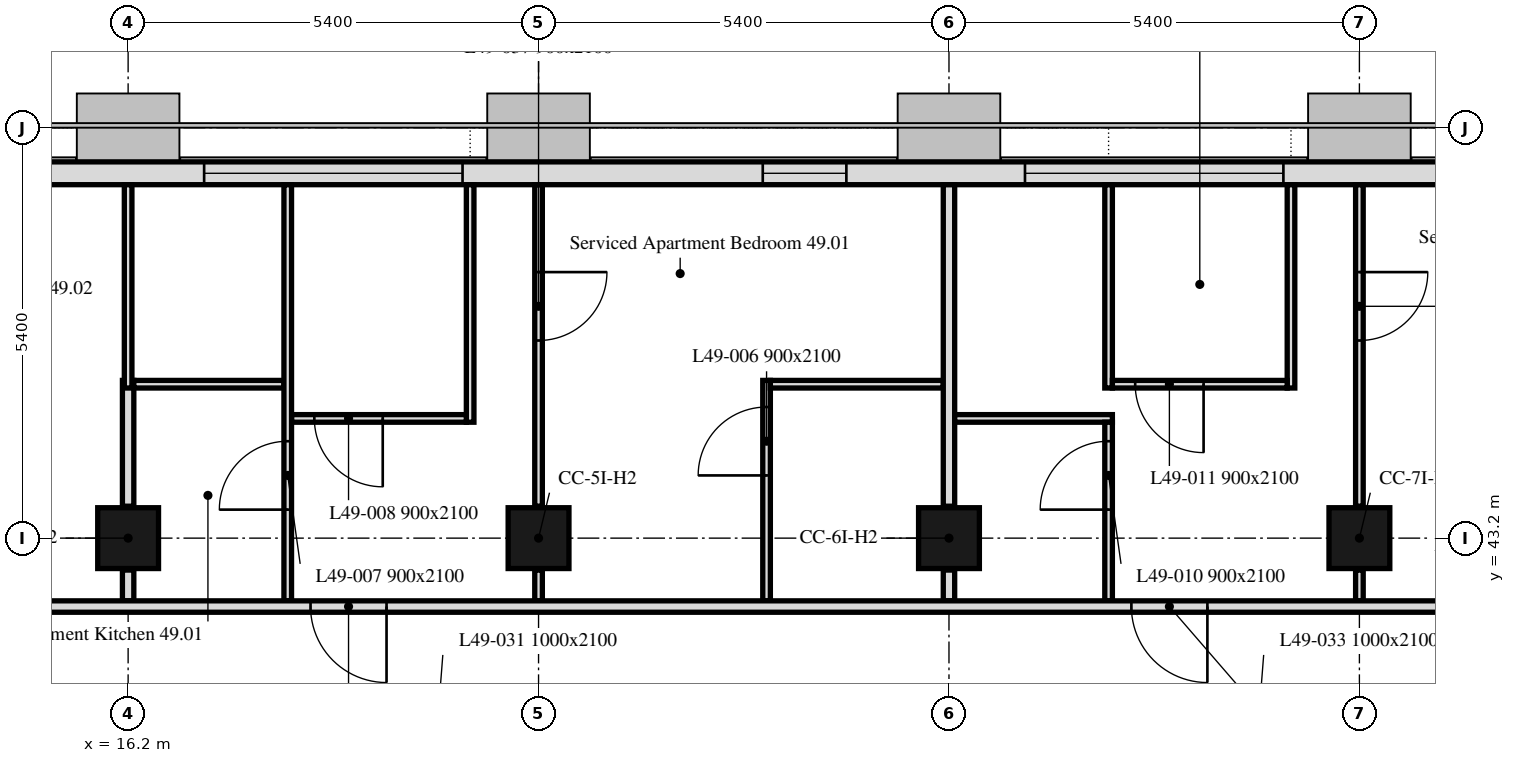
"""IFC4 building model, lengths in metres.
Left out: names, types, materials, properties, quantities, classifications, styles, units other than length and angle.
Written with IfcOpenShell. Run it as: python <this file> out.ifc"""

import sys

from ifc_helpers import new_model, si_unit, direction, frame, frame_2d, origin, origin_2d, place, context, subcontext, project, spatial, rectangle, extrude, element, fill, save


model = new_model("IFC4")
c1 = context("Model", 3, precision=1e-05, world=origin(), true_north=direction((0.0, 1.0)))
c2 = subcontext(c1, "Body", "Model", "MODEL_VIEW")
j1 = project(units=[si_unit("LENGTHUNIT", "METRE"), si_unit("PLANEANGLEUNIT", "RADIAN")], contexts=[c1])
p1 = place(None, origin())
s1 = spatial("IfcSite", under=j1, at=p1, CompositionType="ELEMENT")
p2 = place(p1, origin())
s2 = spatial("IfcBuilding", under=s1, at=p2, CompositionType="ELEMENT")
p3 = place(p2, frame((0.0, 0.0, 200.5)))
s3 = spatial("IfcBuildingStorey", under=s2, at=p3, CompositionType="ELEMENT", Elevation=200.5)
for number, where, z_axis, x_axis in (
    (1, (16.2, 43.2, 0.0), (0.0, 0.0, 1.0), (1.0, 0.0, 0.0)),
    (2, (21.6, 43.2, 0.0), (0.0, 0.0, 1.0), (1.0, 0.0, 0.0)),
    (3, (27.0, 43.2, 0.0), (0.0, 0.0, 1.0), (1.0, 0.0, 0.0)),
    (4, (32.4, 43.2, 0.0), (0.0, 0.0, 1.0), (1.0, 0.0, 0.0)),
):
    element("IfcColumn", number, at=place(p3, frame(where, z_axis=z_axis, x_axis=x_axis)), inside=s3, PredefinedType="COLUMN", context=c2, shape_type="SweptSolid", body=[
        extrude(rectangle(XDim=0.8, YDim=0.8, at=origin_2d()), origin(), (0.0, 0.0, 1.0), 3.0),
    ])
p4 = place(p3, frame((43.014, 48.0, 0.0), z_axis=(0.0, 0.0, 1.0), x_axis=(-1.0, 0.0, 0.0)))
e5 = element("IfcWall", 5, at=p4, inside=s3, PredefinedType="SOLIDWALL", context=c2, shape_type="SweptSolid", body=[
    extrude(rectangle(XDim=32.027, YDim=0.3, at=frame_2d((16.014, 0.0))), origin(), (0.0, 0.0, 1.0), 3.0),
])
p5 = place(p4, frame((0.814, 0.0, 0.9)))
e6 = element("IfcOpeningElement", 6, at=p5, cuts=e5, PredefinedType="OPENING", context=c2, shape_type="SweptSolid", body=[
    extrude(rectangle(XDim=3.4, YDim=1.7, at=frame_2d((1.7, 0.85))), frame((0.0, 0.16, 0.0), z_axis=(0.0, -1.0, 0.0), x_axis=(1.0, 0.0, 0.0)), (0.0, 0.0, 1.0), 0.32),
])
p6 = place(p4, frame((6.564, 0.0, 0.9)))
e7 = element("IfcOpeningElement", 7, at=p6, cuts=e5, PredefinedType="OPENING", context=c2, shape_type="SweptSolid", body=[
    extrude(rectangle(XDim=1.1, YDim=1.7, at=frame_2d((0.55, 0.85))), frame((0.0, 0.16, 0.0), z_axis=(0.0, -1.0, 0.0), x_axis=(1.0, 0.0, 0.0)), (0.0, 0.0, 1.0), 0.32),
])
p7 = place(p4, frame((11.614, 0.0, 0.9)))
e8 = element("IfcOpeningElement", 8, at=p7, cuts=e5, PredefinedType="OPENING", context=c2, shape_type="SweptSolid", body=[
    extrude(rectangle(XDim=3.4, YDim=1.7, at=frame_2d((1.7, 0.85))), frame((0.0, 0.16, 0.0), z_axis=(0.0, -1.0, 0.0), x_axis=(1.0, 0.0, 0.0)), (0.0, 0.0, 1.0), 0.32),
])
p8 = place(p4, frame((17.364, 0.0, 0.9)))
e9 = element("IfcOpeningElement", 9, at=p8, cuts=e5, PredefinedType="OPENING", context=c2, shape_type="SweptSolid", body=[
    extrude(rectangle(XDim=1.1, YDim=1.7, at=frame_2d((0.55, 0.85))), frame((0.0, 0.16, 0.0), z_axis=(0.0, -1.0, 0.0), x_axis=(1.0, 0.0, 0.0)), (0.0, 0.0, 1.0), 0.32),
])
p9 = place(p4, frame((22.414, 0.0, 0.9)))
e10 = element("IfcOpeningElement", 10, at=p9, cuts=e5, PredefinedType="OPENING", context=c2, shape_type="SweptSolid", body=[
    extrude(rectangle(XDim=3.4, YDim=1.7, at=frame_2d((1.7, 0.85))), frame((0.0, 0.16, 0.0), z_axis=(0.0, -1.0, 0.0), x_axis=(1.0, 0.0, 0.0)), (0.0, 0.0, 1.0), 0.32),
])
p10 = place(p4, frame((28.164, 0.0, 0.9)))
e11 = element("IfcOpeningElement", 11, at=p10, cuts=e5, PredefinedType="OPENING", context=c2, shape_type="SweptSolid", body=[
    extrude(rectangle(XDim=1.1, YDim=1.7, at=frame_2d((0.55, 0.85))), frame((0.0, 0.16, 0.0), z_axis=(0.0, -1.0, 0.0), x_axis=(1.0, 0.0, 0.0)), (0.0, 0.0, 1.0), 0.32),
])
p11 = place(p3, frame((16.2, 42.375, 0.0), z_axis=(0.0, 0.0, 1.0), x_axis=(0.0, 1.0, 0.0)))
e12 = element("IfcWall", 12, at=p11, inside=s3, PredefinedType="PARTITIONING", context=c2, shape_type="SweptSolid", body=[
    extrude(rectangle(XDim=0.405, YDim=0.15, at=frame_2d((0.203, 0.0))), origin(), (0.0, 0.0, 1.0), 2.4),
])
p12 = place(p3, frame((16.2, 43.62, 0.0), z_axis=(0.0, 0.0, 1.0), x_axis=(0.0, 1.0, 0.0)))
e13 = element("IfcWall", 13, at=p12, inside=s3, PredefinedType="PARTITIONING", context=c2, shape_type="SweptSolid", body=[
    extrude(rectangle(XDim=1.655, YDim=0.15, at=frame_2d((0.827, 0.0))), origin(), (0.0, 0.0, 1.0), 2.4),
])
p13 = place(p3, frame((16.2, 45.175, 0.0), z_axis=(0.0, 0.0, 1.0), x_axis=(0.0, 1.0, 0.0)))
e14 = element("IfcWall", 14, at=p13, inside=s3, PredefinedType="PARTITIONING", context=c2, shape_type="SweptSolid", body=[
    extrude(rectangle(XDim=2.674, YDim=0.1, at=frame_2d((1.337, 0.0))), origin(), (0.0, 0.0, 1.0), 2.4),
])
p14 = place(p3, frame((21.6, 47.849, 0.0), z_axis=(0.0, 0.0, 1.0), x_axis=(0.0, -1.0, 0.0)))
e15 = element("IfcWall", 15, at=p14, inside=s3, PredefinedType="PARTITIONING", context=c2, shape_type="SweptSolid", body=[
    extrude(rectangle(XDim=4.229, YDim=0.1, at=frame_2d((2.115, 0.0))), origin(), (0.0, 0.0, 1.0), 2.4),
])
p15 = place(p14, frame((1.149, 0.0, 0.0)))
e16 = element("IfcOpeningElement", 16, at=p15, cuts=e15, PredefinedType="OPENING", context=c2, shape_type="SweptSolid", body=[
    extrude(rectangle(XDim=0.9, YDim=2.1, at=frame_2d((0.45, 1.05))), frame((0.0, 0.05, 0.0), z_axis=(0.0, -1.0, 0.0), x_axis=(1.0, 0.0, 0.0)), (0.0, 0.0, 1.0), 0.1),
])
p16 = place(p3, frame((21.6, 42.78, 0.0), z_axis=(0.0, 0.0, 1.0), x_axis=(0.0, -1.0, 0.0)))
e17 = element("IfcWall", 17, at=p16, inside=s3, PredefinedType="PARTITIONING", context=c2, shape_type="SweptSolid", body=[
    extrude(rectangle(XDim=0.405, YDim=0.1, at=frame_2d((0.203, 0.0))), origin(), (0.0, 0.0, 1.0), 2.4),
])
p17 = place(p3, frame((24.6, 42.375, 0.0), z_axis=(0.0, 0.0, 1.0), x_axis=(0.0, 1.0, 0.0)))
e18 = element("IfcWall", 18, at=p17, inside=s3, PredefinedType="PARTITIONING", context=c2, shape_type="SweptSolid", body=[
    extrude(rectangle(XDim=2.9, YDim=0.1, at=frame_2d((1.45, 0.0))), origin(), (0.0, 0.0, 1.0), 3.0),
])
p18 = place(p17, frame((1.65, 0.0, 0.0)))
e19 = element("IfcOpeningElement", 19, at=p18, cuts=e18, PredefinedType="OPENING", context=c2, shape_type="SweptSolid", body=[
    extrude(rectangle(XDim=0.9, YDim=2.1, at=frame_2d((0.45, 1.05))), frame((0.0, 0.05, 0.0), z_axis=(0.0, -1.0, 0.0), x_axis=(1.0, 0.0, 0.0)), (0.0, 0.0, 1.0), 0.1),
])
p19 = place(p3, frame((24.65, 45.225, 0.0), z_axis=(0.0, 0.0, 1.0), x_axis=(1.0, 0.0, 0.0)))
e20 = element("IfcWall", 20, at=p19, inside=s3, PredefinedType="PARTITIONING", context=c2, shape_type="SweptSolid", body=[
    extrude(rectangle(XDim=2.275, YDim=0.1, at=frame_2d((1.138, 0.0))), origin(), (0.0, 0.0, 1.0), 3.0),
])
p20 = place(p3, frame((18.25, 45.225, 0.0), z_axis=(0.0, 0.0, 1.0), x_axis=(-1.0, 0.0, 0.0)))
e21 = element("IfcWall", 21, at=p20, inside=s3, PredefinedType="PARTITIONING", context=c2, shape_type="SweptSolid", body=[
    extrude(rectangle(XDim=1.975, YDim=0.1, at=frame_2d((0.988, 0.0))), origin(), (0.0, 0.0, 1.0), 3.0),
])
p21 = place(p3, frame((20.7, 47.849, 0.0), z_axis=(0.0, 0.0, 1.0), x_axis=(0.0, -1.0, 0.0)))
e22 = element("IfcWall", 22, at=p21, inside=s3, PredefinedType="PARTITIONING", context=c2, shape_type="SweptSolid", body=[
    extrude(rectangle(XDim=3.124, YDim=0.1, at=frame_2d((1.562, 0.0))), origin(), (0.0, 0.0, 1.0), 3.0),
])
p22 = place(p3, frame((20.65, 44.775, 0.0), z_axis=(0.0, 0.0, 1.0), x_axis=(-1.0, 0.0, 0.0)))
e23 = element("IfcWall", 23, at=p22, inside=s3, PredefinedType="PARTITIONING", context=c2, shape_type="SweptSolid", body=[
    extrude(rectangle(XDim=2.3, YDim=0.1, at=frame_2d((1.15, 0.0))), origin(), (0.0, 0.0, 1.0), 3.0),
])
p23 = place(p22, frame((1.1, 0.0, 0.0)))
e24 = element("IfcOpeningElement", 24, at=p23, cuts=e23, PredefinedType="OPENING", context=c2, shape_type="SweptSolid", body=[
    extrude(rectangle(XDim=0.9, YDim=2.1, at=frame_2d((0.45, 1.05))), frame((0.0, 0.05, 0.0), z_axis=(0.0, -1.0, 0.0), x_axis=(1.0, 0.0, 0.0)), (0.0, 0.0, 1.0), 0.1),
])
p24 = place(p3, frame((27.0, 42.375, 0.0), z_axis=(0.0, 0.0, 1.0), x_axis=(0.0, 1.0, 0.0)))
e25 = element("IfcWall", 25, at=p24, inside=s3, PredefinedType="PARTITIONING", context=c2, shape_type="SweptSolid", body=[
    extrude(rectangle(XDim=0.405, YDim=0.15, at=frame_2d((0.203, 0.0))), origin(), (0.0, 0.0, 1.0), 2.4),
])
p25 = place(p3, frame((27.0, 43.62, 0.0), z_axis=(0.0, 0.0, 1.0), x_axis=(0.0, 1.0, 0.0)))
e26 = element("IfcWall", 26, at=p25, inside=s3, PredefinedType="PARTITIONING", context=c2, shape_type="SweptSolid", body=[
    extrude(rectangle(XDim=4.229, YDim=0.15, at=frame_2d((2.115, 0.0))), origin(), (0.0, 0.0, 1.0), 2.4),
])
p26 = place(p3, frame((18.3, 42.375, 0.0), z_axis=(0.0, 0.0, 1.0), x_axis=(0.0, 1.0, 0.0)))
e27 = element("IfcWall", 27, at=p26, inside=s3, PredefinedType="PARTITIONING", context=c2, shape_type="SweptSolid", body=[
    extrude(rectangle(XDim=5.474, YDim=0.1, at=frame_2d((2.737, 0.0))), origin(), (0.0, 0.0, 1.0), 3.0),
])
p27 = place(p26, frame((1.2, 0.0, 0.0)))
e28 = element("IfcOpeningElement", 28, at=p27, cuts=e27, PredefinedType="OPENING", context=c2, shape_type="SweptSolid", body=[
    extrude(rectangle(XDim=0.9, YDim=2.1, at=frame_2d((0.45, 1.05))), frame((0.0, 0.05, 0.0), z_axis=(0.0, -1.0, 0.0), x_axis=(1.0, 0.0, 0.0)), (0.0, 0.0, 1.0), 0.1),
])
p28 = place(p3, frame((32.4, 47.849, 0.0), z_axis=(0.0, 0.0, 1.0), x_axis=(0.0, -1.0, 0.0)))
e29 = element("IfcWall", 29, at=p28, inside=s3, PredefinedType="PARTITIONING", context=c2, shape_type="SweptSolid", body=[
    extrude(rectangle(XDim=4.229, YDim=0.1, at=frame_2d((2.115, 0.0))), origin(), (0.0, 0.0, 1.0), 2.4),
])
p29 = place(p28, frame((1.149, 0.0, 0.0)))
e30 = element("IfcOpeningElement", 30, at=p29, cuts=e29, PredefinedType="OPENING", context=c2, shape_type="SweptSolid", body=[
    extrude(rectangle(XDim=0.9, YDim=2.1, at=frame_2d((0.45, 1.05))), frame((0.0, 0.05, 0.0), z_axis=(0.0, -1.0, 0.0), x_axis=(1.0, 0.0, 0.0)), (0.0, 0.0, 1.0), 0.1),
])
p30 = place(p3, frame((32.4, 42.78, 0.0), z_axis=(0.0, 0.0, 1.0), x_axis=(0.0, -1.0, 0.0)))
e31 = element("IfcWall", 31, at=p30, inside=s3, PredefinedType="PARTITIONING", context=c2, shape_type="SweptSolid", body=[
    extrude(rectangle(XDim=0.405, YDim=0.1, at=frame_2d((0.203, 0.0))), origin(), (0.0, 0.0, 1.0), 2.4),
])
p31 = place(p3, frame((29.15, 44.775, 0.0), z_axis=(0.0, 0.0, 1.0), x_axis=(-1.0, 0.0, 0.0)))
e32 = element("IfcWall", 32, at=p31, inside=s3, PredefinedType="PARTITIONING", context=c2, shape_type="SweptSolid", body=[
    extrude(rectangle(XDim=2.075, YDim=0.1, at=frame_2d((1.038, 0.0))), origin(), (0.0, 0.0, 1.0), 3.0),
])
p32 = place(p3, frame((29.1, 42.375, 0.0), z_axis=(0.0, 0.0, 1.0), x_axis=(0.0, 1.0, 0.0)))
e33 = element("IfcWall", 33, at=p32, inside=s3, PredefinedType="PARTITIONING", context=c2, shape_type="SweptSolid", body=[
    extrude(rectangle(XDim=2.35, YDim=0.1, at=frame_2d((1.175, 0.0))), origin(), (0.0, 0.0, 1.0), 3.0),
])
p33 = place(p32, frame((1.2, 0.0, 0.0)))
e34 = element("IfcOpeningElement", 34, at=p33, cuts=e33, PredefinedType="OPENING", context=c2, shape_type="SweptSolid", body=[
    extrude(rectangle(XDim=0.9, YDim=2.1, at=frame_2d((0.45, 1.05))), frame((0.0, 0.05, 0.0), z_axis=(0.0, -1.0, 0.0), x_axis=(1.0, 0.0, 0.0)), (0.0, 0.0, 1.0), 0.1),
])
for number, where, z_axis, x_axis in (
    (35, (29.1, 45.175, 0.0), (0.0, 0.0, 1.0), (0.0, 1.0, 0.0)),
    (36, (31.5, 47.849, 0.0), (0.0, 0.0, 1.0), (0.0, -1.0, 0.0)),
):
    element("IfcWall", number, at=place(p3, frame(where, z_axis=z_axis, x_axis=x_axis)), inside=s3, PredefinedType="PARTITIONING", context=c2, shape_type="SweptSolid", body=[
        extrude(rectangle(XDim=2.674, YDim=0.1, at=frame_2d((1.337, 0.0))), origin(), (0.0, 0.0, 1.0), 3.0),
    ])
p34 = place(p3, frame((31.45, 45.225, 0.0), z_axis=(0.0, 0.0, 1.0), x_axis=(-1.0, 0.0, 0.0)))
e37 = element("IfcWall", 37, at=p34, inside=s3, PredefinedType="PARTITIONING", context=c2, shape_type="SweptSolid", body=[
    extrude(rectangle(XDim=2.3, YDim=0.1, at=frame_2d((1.15, 0.0))), origin(), (0.0, 0.0, 1.0), 3.0),
])
p35 = place(p34, frame((1.1, 0.0, 0.0)))
e38 = element("IfcOpeningElement", 38, at=p35, cuts=e37, PredefinedType="OPENING", context=c2, shape_type="SweptSolid", body=[
    extrude(rectangle(XDim=0.9, YDim=2.1, at=frame_2d((0.45, 1.05))), frame((0.0, 0.05, 0.0), z_axis=(0.0, -1.0, 0.0), x_axis=(1.0, 0.0, 0.0)), (0.0, 0.0, 1.0), 0.1),
])
p36 = place(p3, frame((47.849, 42.3, 0.0), z_axis=(0.0, 0.0, 1.0), x_axis=(-1.0, 0.0, 0.0)))
e39 = element("IfcWall", 39, at=p36, inside=s3, PredefinedType="PARTITIONING", context=c2, shape_type="SweptSolid", body=[
    extrude(rectangle(XDim=41.698, YDim=0.15, at=frame_2d((20.849, 0.0))), origin(), (0.0, 0.0, 1.0), 2.4),
])
p37 = place(p36, frame((39.566, 0.0, 0.0)))
e40 = element("IfcOpeningElement", 40, at=p37, cuts=e39, PredefinedType="OPENING", context=c2, shape_type="SweptSolid", body=[
    extrude(rectangle(XDim=1.0, YDim=2.1, at=frame_2d((0.5, 1.05))), frame((0.0, 0.075, 0.0), z_axis=(0.0, -1.0, 0.0), x_axis=(1.0, 0.0, 0.0)), (0.0, 0.0, 1.0), 0.15),
])
p38 = place(p36, frame((3.099, 0.0, 0.0)))
e41 = element("IfcOpeningElement", 41, at=p38, cuts=e39, PredefinedType="OPENING", context=c2, shape_type="SweptSolid", body=[
    extrude(rectangle(XDim=1.0, YDim=2.1, at=frame_2d((0.5, 1.05))), frame((0.0, 0.075, 0.0), z_axis=(0.0, -1.0, 0.0), x_axis=(1.0, 0.0, 0.0)), (0.0, 0.0, 1.0), 0.15),
])
p39 = place(p36, frame((28.249, 0.0, 0.0)))
e42 = element("IfcOpeningElement", 42, at=p39, cuts=e39, PredefinedType="OPENING", context=c2, shape_type="SweptSolid", body=[
    extrude(rectangle(XDim=1.0, YDim=2.1, at=frame_2d((0.5, 1.05))), frame((0.0, 0.075, 0.0), z_axis=(0.0, -1.0, 0.0), x_axis=(1.0, 0.0, 0.0)), (0.0, 0.0, 1.0), 0.15),
])
p40 = place(p36, frame((17.449, 0.0, 0.0)))
e43 = element("IfcOpeningElement", 43, at=p40, cuts=e39, PredefinedType="OPENING", context=c2, shape_type="SweptSolid", body=[
    extrude(rectangle(XDim=1.0, YDim=2.1, at=frame_2d((0.5, 1.05))), frame((0.0, 0.075, 0.0), z_axis=(0.0, -1.0, 0.0), x_axis=(1.0, 0.0, 0.0)), (0.0, 0.0, 1.0), 0.15),
])
p41 = place(p7, origin())
e44 = element("IfcWindow", 44, at=p41, inside=s3, PartitioningType="SINGLE_PANEL", PredefinedType="WINDOW", context=c2, shape_type="SweptSolid", body=[
    extrude(rectangle(XDim=3.4, YDim=1.7, at=frame_2d((1.7, 0.85))), frame((0.0, 0.03, 0.0), z_axis=(0.0, -1.0, 0.0), x_axis=(1.0, 0.0, 0.0)), (0.0, 0.0, 1.0), 0.06),
])
fill(e8, e44)
p42 = place(p8, origin())
e45 = element("IfcWindow", 45, at=p42, inside=s3, PartitioningType="SINGLE_PANEL", PredefinedType="WINDOW", context=c2, shape_type="SweptSolid", body=[
    extrude(rectangle(XDim=1.1, YDim=1.7, at=frame_2d((0.55, 0.85))), frame((0.0, 0.03, 0.0), z_axis=(0.0, -1.0, 0.0), x_axis=(1.0, 0.0, 0.0)), (0.0, 0.0, 1.0), 0.06),
])
fill(e9, e45)
p43 = place(p9, origin())
e46 = element("IfcWindow", 46, at=p43, inside=s3, PartitioningType="SINGLE_PANEL", PredefinedType="WINDOW", context=c2, shape_type="SweptSolid", body=[
    extrude(rectangle(XDim=3.4, YDim=1.7, at=frame_2d((1.7, 0.85))), frame((0.0, 0.03, 0.0), z_axis=(0.0, -1.0, 0.0), x_axis=(1.0, 0.0, 0.0)), (0.0, 0.0, 1.0), 0.06),
])
fill(e10, e46)
p44 = place(p18, origin())
e47 = element("IfcDoor", 47, at=p44, inside=s3, OperationType="SINGLE_SWING_RIGHT", PredefinedType="DOOR", context=c2, shape_type="SweptSolid", body=[
    extrude(rectangle(XDim=0.9, YDim=2.1, at=frame_2d((0.45, 1.05))), frame((0.0, 0.025, 0.0), z_axis=(0.0, -1.0, 0.0), x_axis=(1.0, 0.0, 0.0)), (0.0, 0.0, 1.0), 0.05),
])
fill(e19, e47)
p45 = place(p27, origin())
e48 = element("IfcDoor", 48, at=p45, inside=s3, OperationType="SINGLE_SWING_LEFT", PredefinedType="DOOR", context=c2, shape_type="SweptSolid", body=[
    extrude(rectangle(XDim=0.9, YDim=2.1, at=frame_2d((0.45, 1.05))), frame((0.0, 0.025, 0.0), z_axis=(0.0, -1.0, 0.0), x_axis=(1.0, 0.0, 0.0)), (0.0, 0.0, 1.0), 0.05),
])
fill(e28, e48)
p46 = place(p23, origin())
e49 = element("IfcDoor", 49, at=p46, inside=s3, OperationType="SINGLE_SWING_RIGHT", PredefinedType="DOOR", context=c2, shape_type="SweptSolid", body=[
    extrude(rectangle(XDim=0.9, YDim=2.1, at=frame_2d((0.45, 1.05))), frame((0.0, 0.025, 0.0), z_axis=(0.0, -1.0, 0.0), x_axis=(1.0, 0.0, 0.0)), (0.0, 0.0, 1.0), 0.05),
])
fill(e24, e49)
p47 = place(p33, origin())
e50 = element("IfcDoor", 50, at=p47, inside=s3, OperationType="SINGLE_SWING_RIGHT", PredefinedType="DOOR", context=c2, shape_type="SweptSolid", body=[
    extrude(rectangle(XDim=0.9, YDim=2.1, at=frame_2d((0.45, 1.05))), frame((0.0, 0.025, 0.0), z_axis=(0.0, -1.0, 0.0), x_axis=(1.0, 0.0, 0.0)), (0.0, 0.0, 1.0), 0.05),
])
fill(e34, e50)
p48 = place(p35, origin())
e51 = element("IfcDoor", 51, at=p48, inside=s3, OperationType="SINGLE_SWING_LEFT", PredefinedType="DOOR", context=c2, shape_type="SweptSolid", body=[
    extrude(rectangle(XDim=0.9, YDim=2.1, at=frame_2d((0.45, 1.05))), frame((0.0, 0.025, 0.0), z_axis=(0.0, -1.0, 0.0), x_axis=(1.0, 0.0, 0.0)), (0.0, 0.0, 1.0), 0.05),
])
fill(e38, e51)
p49 = place(p15, origin())
e52 = element("IfcDoor", 52, at=p49, inside=s3, OperationType="SINGLE_SWING_LEFT", PredefinedType="DOOR", context=c2, shape_type="SweptSolid", body=[
    extrude(rectangle(XDim=0.9, YDim=2.1, at=frame_2d((0.45, 1.05))), frame((0.0, 0.025, 0.0), z_axis=(0.0, -1.0, 0.0), x_axis=(1.0, 0.0, 0.0)), (0.0, 0.0, 1.0), 0.05),
])
fill(e16, e52)
p50 = place(p29, origin())
e53 = element("IfcDoor", 53, at=p50, inside=s3, OperationType="SINGLE_SWING_RIGHT", PredefinedType="DOOR", context=c2, shape_type="SweptSolid", body=[
    extrude(rectangle(XDim=0.9, YDim=2.1, at=frame_2d((0.45, 1.05))), frame((0.0, 0.025, 0.0), z_axis=(0.0, -1.0, 0.0), x_axis=(1.0, 0.0, 0.0)), (0.0, 0.0, 1.0), 0.05),
])
fill(e30, e53)
p51 = place(p39, origin())
e54 = element("IfcDoor", 54, at=p51, inside=s3, OperationType="SINGLE_SWING_LEFT", PredefinedType="DOOR", context=c2, shape_type="SweptSolid", body=[
    extrude(rectangle(XDim=1.0, YDim=2.1, at=frame_2d((0.5, 1.05))), frame((0.0, 0.025, 0.0), z_axis=(0.0, -1.0, 0.0), x_axis=(1.0, 0.0, 0.0)), (0.0, 0.0, 1.0), 0.05),
])
fill(e42, e54)
p52 = place(p40, origin())
e55 = element("IfcDoor", 55, at=p52, inside=s3, OperationType="SINGLE_SWING_LEFT", PredefinedType="DOOR", context=c2, shape_type="SweptSolid", body=[
    extrude(rectangle(XDim=1.0, YDim=2.1, at=frame_2d((0.5, 1.05))), frame((0.0, 0.025, 0.0), z_axis=(0.0, -1.0, 0.0), x_axis=(1.0, 0.0, 0.0)), (0.0, 0.0, 1.0), 0.05),
])
fill(e43, e55)
save(model, sys.argv[1])
